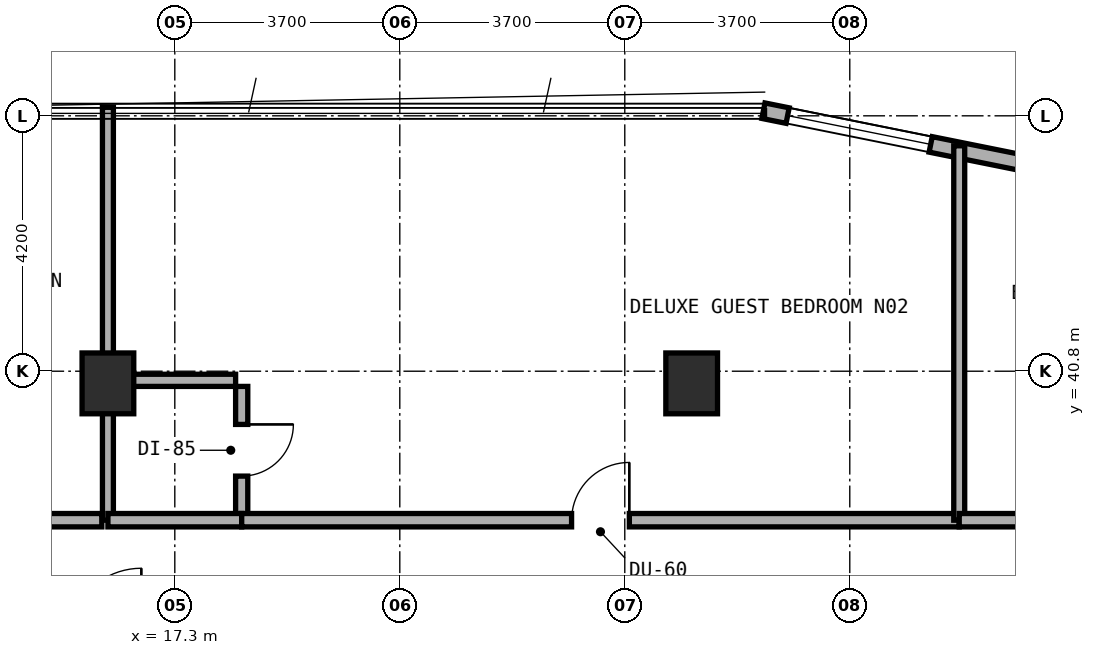
"""IFC4 building model, lengths in metres.
Left out: names, types, materials, properties, quantities, classifications, styles, units other than length and angle.
Written with IfcOpenShell. Run it as: python <this file> out.ifc"""

import sys

from ifc_helpers import new_model, si_unit, direction, frame, frame_2d, origin, origin_2d, place, context, subcontext, project, spatial, rectangle, extrude, element, fill, save


model = new_model("IFC4")
c1 = context("Model", 3, precision=1e-05, world=origin(), true_north=direction((0.0, 1.0)))
c2 = subcontext(c1, "Body", "Model", "MODEL_VIEW")
j1 = project(units=[si_unit("LENGTHUNIT", "METRE"), si_unit("PLANEANGLEUNIT", "RADIAN")], contexts=[c1])
p1 = place(None, origin())
s1 = spatial("IfcSite", under=j1, at=p1, CompositionType="ELEMENT")
p2 = place(p1, origin())
s2 = spatial("IfcBuilding", under=s1, at=p2, CompositionType="ELEMENT")
p3 = place(p2, frame((0.0, 0.0, 116.0)))
s3 = spatial("IfcBuildingStorey", under=s2, at=p3, CompositionType="ELEMENT", Elevation=116.0)
for number, where, z_axis, x_axis in (
    (1, (16.2, 40.6, 0.0), (0.0, 0.0, 1.0), (1.0, 0.0, 0.0)),
    (2, (25.8, 40.6, 0.0), (0.0, 0.0, 1.0), (1.0, 0.0, 0.0)),
):
    element("IfcColumn", number, at=place(p3, frame(where, z_axis=z_axis, x_axis=x_axis)), inside=s3, PredefinedType="COLUMN", context=c2, shape_type="SweptSolid", body=[
        extrude(rectangle(XDim=0.85, YDim=1.0, at=origin_2d()), origin(), (0.0, 0.0, 1.0), 3.5),
    ])
p4 = place(p3, frame((35.982, 43.271, 0.0), z_axis=(0.0, 0.0, 1.0), x_axis=(-0.980315963543, 0.197435082048, 0.0)))
e3 = element("IfcWall", 3, at=p4, inside=s3, PredefinedType="STANDARD", context=c2, shape_type="SweptSolid", body=[
    extrude(rectangle(XDim=9.183, YDim=0.26, at=frame_2d((4.591, 0.0))), origin(), (0.0, 0.0, 1.0), 3.18),
])
p5 = place(p4, frame((1.687, 0.0, 0.8)))
e4 = element("IfcOpeningElement", 4, at=p5, cuts=e3, PredefinedType="OPENING", context=c2, shape_type="SweptSolid", body=[
    extrude(rectangle(XDim=2.4, YDim=1.6, at=frame_2d((1.2, 0.8))), frame((0.0, 0.14, 0.0), z_axis=(0.0, -1.0, 0.0), x_axis=(1.0, 0.0, 0.0)), (0.0, 0.0, 1.0), 0.28),
])
p6 = place(p4, frame((6.377, 0.0, 0.8)))
e5 = element("IfcOpeningElement", 5, at=p6, cuts=e3, PredefinedType="OPENING", context=c2, shape_type="SweptSolid", body=[
    extrude(rectangle(XDim=2.4, YDim=1.6, at=frame_2d((1.2, 0.8))), frame((0.0, 0.14, 0.0), z_axis=(0.0, -1.0, 0.0), x_axis=(1.0, 0.0, 0.0)), (0.0, 0.0, 1.0), 0.28),
])
p7 = place(p3, frame((7.9, 38.35, 0.0), z_axis=(0.0, 0.0, 1.0), x_axis=(1.0, 0.0, 0.0)))
e6 = element("IfcWall", 6, at=p7, inside=s3, PredefinedType="SOLIDWALL", context=c2, shape_type="SweptSolid", body=[
    extrude(rectangle(XDim=8.2, YDim=0.22, at=frame_2d((4.1, 0.0))), origin(), (0.0, 0.0, 1.0), 3.18),
])
p8 = place(p7, frame((3.252, 0.0, 0.0)))
e7 = element("IfcOpeningElement", 7, at=p8, cuts=e6, PredefinedType="OPENING", context=c2, shape_type="SweptSolid", body=[
    extrude(rectangle(XDim=0.95, YDim=2.1, at=frame_2d((0.475, 1.05))), frame((0.0, 0.12, 0.0), z_axis=(0.0, -1.0, 0.0), x_axis=(1.0, 0.0, 0.0)), (0.0, 0.0, 1.0), 0.24),
])
p9 = place(p3, frame((16.2, 38.35, 0.0), z_axis=(0.0, 0.0, 1.0), x_axis=(0.0, 1.0, 0.0)))
e8 = element("IfcWall", 8, at=p9, inside=s3, PredefinedType="SOLIDWALL", context=c2, shape_type="SweptSolid", body=[
    extrude(rectangle(XDim=6.79, YDim=0.18, at=frame_2d((3.395, 0.0))), origin(), (0.0, 0.0, 1.0), 2.655),
])
p10 = place(p3, frame((18.4, 38.45, 0.0), z_axis=(0.0, 0.0, 1.0), x_axis=(0.0, 1.0, 0.0)))
e9 = element("IfcWall", 9, at=p10, inside=s3, PredefinedType="PLUMBINGWALL", context=c2, shape_type="SweptSolid", body=[
    extrude(rectangle(XDim=2.1, YDim=0.2, at=frame_2d((1.05, 0.0))), origin(), (0.0, 0.0, 1.0), 2.795),
])
p11 = place(p10, frame((0.625, 0.0, 0.0)))
e10 = element("IfcOpeningElement", 10, at=p11, cuts=e9, PredefinedType="OPENING", context=c2, shape_type="SweptSolid", body=[
    extrude(rectangle(XDim=0.85, YDim=2.1, at=frame_2d((0.425, 1.05))), frame((0.0, 0.11, 0.0), z_axis=(0.0, -1.0, 0.0), x_axis=(1.0, 0.0, 0.0)), (0.0, 0.0, 1.0), 0.22),
])
p12 = place(p3, frame((16.3, 40.65, 0.0), z_axis=(0.0, 0.0, 1.0), x_axis=(1.0, 0.0, 0.0)))
e11 = element("IfcWall", 11, at=p12, inside=s3, PredefinedType="PLUMBINGWALL", context=c2, shape_type="SweptSolid", body=[
    extrude(rectangle(XDim=2.0, YDim=0.2, at=frame_2d((1.0, 0.0))), origin(), (0.0, 0.0, 1.0), 2.795),
])
p13 = place(p3, frame((16.2, 38.35, 0.0), z_axis=(0.0, 0.0, 1.0), x_axis=(1.0, 0.0, 0.0)))
e12 = element("IfcWall", 12, at=p13, inside=s3, PredefinedType="SOLIDWALL", context=c2, shape_type="SweptSolid", body=[
    extrude(rectangle(XDim=2.2, YDim=0.22, at=frame_2d((1.1, 0.0))), origin(), (0.0, 0.0, 1.0), 2.655),
])
p14 = place(p3, frame((18.4, 38.35, 0.0), z_axis=(0.0, 0.0, 1.0), x_axis=(1.0, 0.0, 0.0)))
e13 = element("IfcWall", 13, at=p14, inside=s3, PredefinedType="SOLIDWALL", context=c2, shape_type="SweptSolid", body=[
    extrude(rectangle(XDim=11.8, YDim=0.22, at=frame_2d((5.9, 0.0))), origin(), (0.0, 0.0, 1.0), 2.655),
])
p15 = place(p14, frame((5.425, 0.0, 0.0)))
e14 = element("IfcOpeningElement", 14, at=p15, cuts=e13, PredefinedType="OPENING", context=c2, shape_type="SweptSolid", body=[
    extrude(rectangle(XDim=0.95, YDim=2.1, at=frame_2d((0.475, 1.05))), frame((0.0, 0.12, 0.0), z_axis=(0.0, -1.0, 0.0), x_axis=(1.0, 0.0, 0.0)), (0.0, 0.0, 1.0), 0.24),
])
p16 = place(p3, frame((30.2, 38.35, 0.0), z_axis=(0.0, 0.0, 1.0), x_axis=(0.0, 1.0, 0.0)))
e15 = element("IfcWall", 15, at=p16, inside=s3, PredefinedType="SOLIDWALL", context=c2, shape_type="SweptSolid", body=[
    extrude(rectangle(XDim=6.157, YDim=0.18, at=frame_2d((3.079, 0.0))), origin(), (0.0, 0.0, 1.0), 2.795),
])
p17 = place(p3, frame((30.2, 38.35, 0.0), z_axis=(0.0, 0.0, 1.0), x_axis=(1.0, 0.0, 0.0)))
e16 = element("IfcWall", 16, at=p17, inside=s3, PredefinedType="SOLIDWALL", context=c2, shape_type="SweptSolid", body=[
    extrude(rectangle(XDim=6.25, YDim=0.22, at=frame_2d((3.125, 0.0))), origin(), (0.0, 0.0, 1.0), 2.655),
])
p18 = place(p17, frame((2.37, 0.0, 0.0)))
e17 = element("IfcOpeningElement", 17, at=p18, cuts=e16, PredefinedType="OPENING", context=c2, shape_type="SweptSolid", body=[
    extrude(rectangle(XDim=0.95, YDim=2.1, at=frame_2d((0.475, 1.05))), frame((0.0, 0.12, 0.0), z_axis=(0.0, -1.0, 0.0), x_axis=(1.0, 0.0, 0.0)), (0.0, 0.0, 1.0), 0.24),
])
p19 = place(p6, origin())
e18 = element("IfcWindow", 18, at=p19, inside=s3, PartitioningType="SINGLE_PANEL", PredefinedType="WINDOW", context=c2, shape_type="SweptSolid", body=[
    extrude(rectangle(XDim=2.4, YDim=1.6, at=frame_2d((1.2, 0.8))), frame((0.0, 0.03, 0.0), z_axis=(0.0, -1.0, 0.0), x_axis=(1.0, 0.0, 0.0)), (0.0, 0.0, 1.0), 0.06),
])
fill(e5, e18)
p20 = place(p11, frame((0.85, 0.0, 0.0), z_axis=(0.0, 0.0, 1.0), x_axis=(-1.0, 0.0, 0.0)))
e19 = element("IfcDoor", 19, at=p20, inside=s3, OperationType="SINGLE_SWING_LEFT", PredefinedType="DOOR", context=c2, shape_type="SweptSolid", body=[
    extrude(rectangle(XDim=0.85, YDim=2.1, at=frame_2d((0.425, 1.05))), frame((0.0, 0.025, 0.0), z_axis=(0.0, -1.0, 0.0), x_axis=(1.0, 0.0, 0.0)), (0.0, 0.0, 1.0), 0.05),
])
fill(e10, e19)
p21 = place(p15, origin())
e20 = element("IfcDoor", 20, at=p21, inside=s3, OperationType="SINGLE_SWING_RIGHT", PredefinedType="DOOR", context=c2, shape_type="SweptSolid", body=[
    extrude(rectangle(XDim=0.95, YDim=2.1, at=frame_2d((0.475, 1.05))), frame((0.0, 0.025, 0.0), z_axis=(0.0, -1.0, 0.0), x_axis=(1.0, 0.0, 0.0)), (0.0, 0.0, 1.0), 0.05),
])
fill(e14, e20)
save(model, sys.argv[1])
